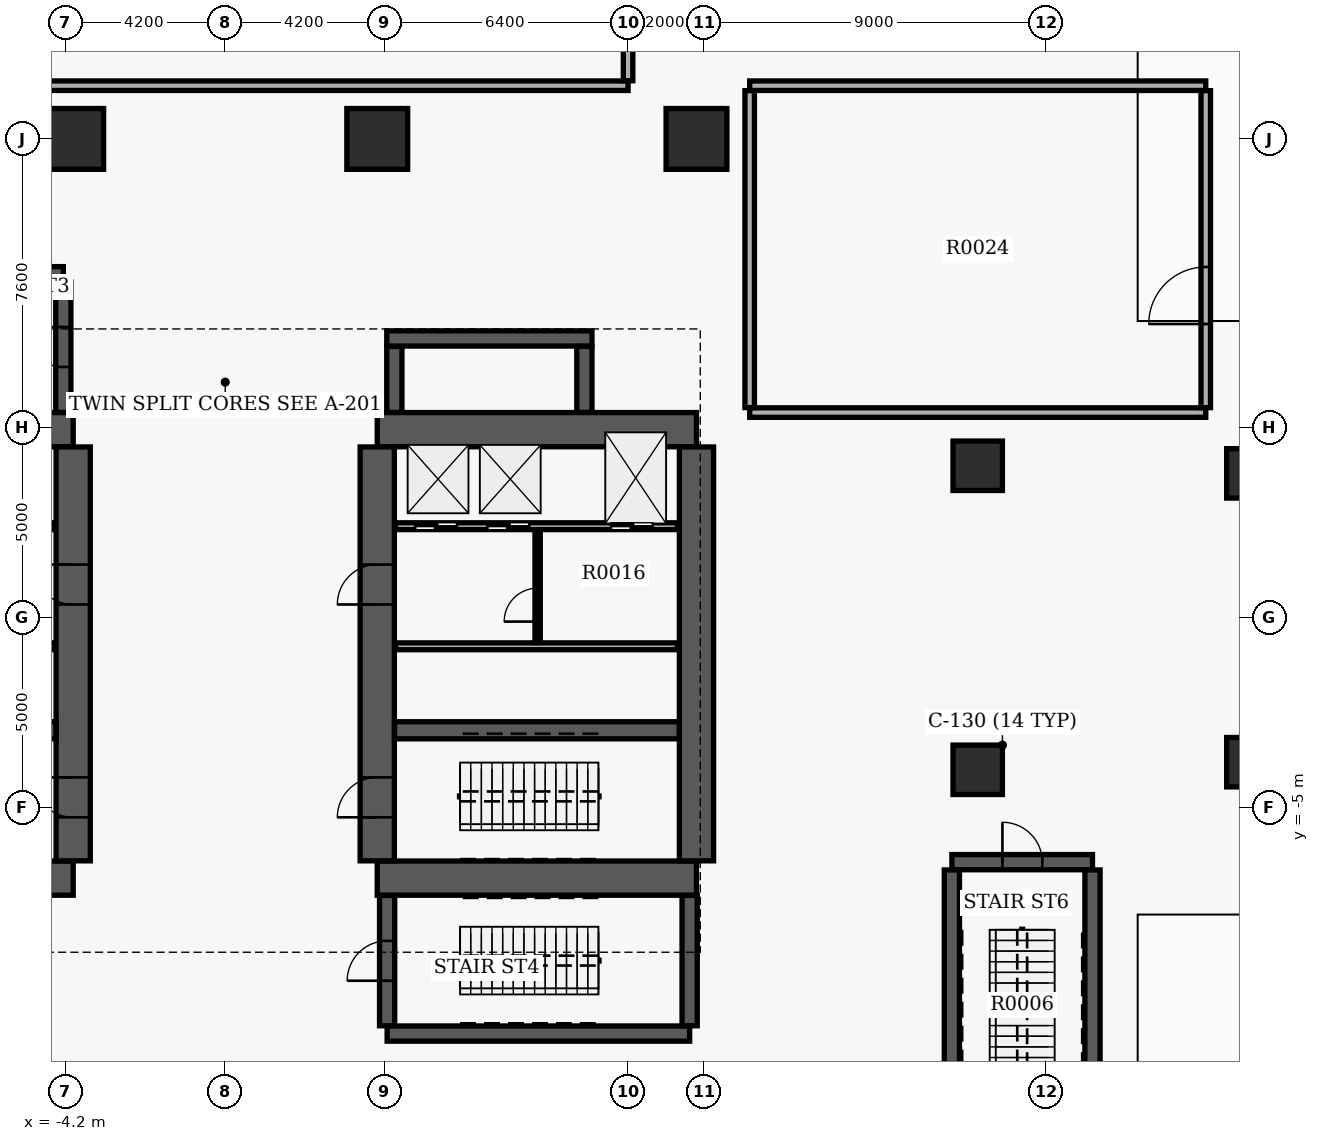
"""IFC4 building model, lengths in metres.
Left out: names, types, materials, properties, quantities, classifications, styles, units other than length and angle.
Written with IfcOpenShell. Run it as: python <this file> out.ifc"""

import sys

from ifc_helpers import new_model, si_unit, direction, frame, frame_2d, origin, origin_2d, place, context, subcontext, project, spatial, rectangle, extrude, element, fill, save


model = new_model("IFC4")
c1 = context("Model", 3, precision=1e-05, world=origin(), true_north=direction((0.0, 1.0)))
c2 = subcontext(c1, "Body", "Model", "MODEL_VIEW")
j1 = project(units=[si_unit("LENGTHUNIT", "METRE"), si_unit("PLANEANGLEUNIT", "RADIAN")], contexts=[c1])
p1 = place(None, origin())
s1 = spatial("IfcSite", under=j1, at=p1, CompositionType="ELEMENT")
p2 = place(p1, origin())
s2 = spatial("IfcBuilding", under=s1, at=p2, CompositionType="ELEMENT")
p3 = place(p2, frame((0.0, 0.0, -10.4)))
s3 = spatial("IfcBuildingStorey", under=s2, at=p3, CompositionType="ELEMENT", Elevation=-10.4)
for number, where, z_axis, x_axis in (
    (1, (-12.4, -6.85, 0.0), (0.0, 0.0, 1.0), (1.0, 0.0, 0.0)),
    (2, (-12.4, 4.95, 0.0), (0.0, 0.0, 1.0), (1.0, 0.0, 0.0)),
):
    element("IfcWall", number, at=place(p3, frame(where, z_axis=z_axis, x_axis=x_axis)), inside=s3, PredefinedType="SHEAR", context=c2, shape_type="SweptSolid", body=[
        extrude(rectangle(XDim=8.4, YDim=0.9, at=frame_2d((4.2, 0.0))), origin(), (0.0, 0.0, 1.0), 4.85),
    ])
p4 = place(p3, frame((-4.0, -6.395, 0.0), z_axis=(0.0, 0.0, 1.0), x_axis=(0.0, 1.0, 0.0)))
e3 = element("IfcWall", 3, at=p4, inside=s3, PredefinedType="SHEAR", context=c2, shape_type="SweptSolid", body=[
    extrude(rectangle(XDim=10.89, YDim=0.9, at=frame_2d((5.445, 0.0))), origin(), (0.0, 0.0, 1.0), 4.85),
])
p5 = place(p4, frame((1.145, 0.0, 0.0)))
e4 = element("IfcOpeningElement", 4, at=p5, cuts=e3, PredefinedType="OPENING", context=c2, shape_type="SweptSolid", body=[
    extrude(rectangle(XDim=1.05, YDim=2.15, at=frame_2d((0.525, 1.075))), frame((0.0, 0.46, 0.0), z_axis=(0.0, -1.0, 0.0), x_axis=(1.0, 0.0, 0.0)), (0.0, 0.0, 1.0), 0.92),
])
p6 = place(p4, frame((6.745, 0.0, 0.0)))
e5 = element("IfcOpeningElement", 5, at=p6, cuts=e3, PredefinedType="OPENING", context=c2, shape_type="SweptSolid", body=[
    extrude(rectangle(XDim=1.05, YDim=2.15, at=frame_2d((0.525, 1.075))), frame((0.0, 0.46, 0.0), z_axis=(0.0, -1.0, 0.0), x_axis=(1.0, 0.0, 0.0)), (0.0, 0.0, 1.0), 0.92),
])
p7 = place(p3, frame((-11.945, -2.96, 0.0), z_axis=(0.0, 0.0, 1.0), x_axis=(1.0, 0.0, 0.0)))
e6 = element("IfcWall", 6, at=p7, inside=s3, PredefinedType="SHEAR", context=c2, shape_type="SweptSolid", body=[
    extrude(rectangle(XDim=7.49, YDim=0.45, at=frame_2d((3.745, 0.0))), origin(), (0.0, 0.0, 1.0), 4.85),
])
for number, where, z_axis, x_axis in (
    (7, (4.0, -6.85, 0.0), (0.0, 0.0, 1.0), (1.0, 0.0, 0.0)),
    (8, (4.0, 4.95, 0.0), (0.0, 0.0, 1.0), (1.0, 0.0, 0.0)),
):
    element("IfcWall", number, at=place(p3, frame(where, z_axis=z_axis, x_axis=x_axis)), inside=s3, PredefinedType="SHEAR", context=c2, shape_type="SweptSolid", body=[
        extrude(rectangle(XDim=8.4, YDim=0.9, at=frame_2d((4.2, 0.0))), origin(), (0.0, 0.0, 1.0), 4.85),
    ])
p8 = place(p3, frame((4.0, -6.395, 0.0), z_axis=(0.0, 0.0, 1.0), x_axis=(0.0, 1.0, 0.0)))
e9 = element("IfcWall", 9, at=p8, inside=s3, PredefinedType="SHEAR", context=c2, shape_type="SweptSolid", body=[
    extrude(rectangle(XDim=10.89, YDim=0.9, at=frame_2d((5.445, 0.0))), origin(), (0.0, 0.0, 1.0), 4.85),
])
p9 = place(p8, frame((1.145, 0.0, 0.0)))
e10 = element("IfcOpeningElement", 10, at=p9, cuts=e9, PredefinedType="OPENING", context=c2, shape_type="SweptSolid", body=[
    extrude(rectangle(XDim=1.05, YDim=2.15, at=frame_2d((0.525, 1.075))), frame((0.0, 0.46, 0.0), z_axis=(0.0, -1.0, 0.0), x_axis=(1.0, 0.0, 0.0)), (0.0, 0.0, 1.0), 0.92),
])
p10 = place(p8, frame((6.745, 0.0, 0.0)))
e11 = element("IfcOpeningElement", 11, at=p10, cuts=e9, PredefinedType="OPENING", context=c2, shape_type="SweptSolid", body=[
    extrude(rectangle(XDim=1.05, YDim=2.15, at=frame_2d((0.525, 1.075))), frame((0.0, 0.46, 0.0), z_axis=(0.0, -1.0, 0.0), x_axis=(1.0, 0.0, 0.0)), (0.0, 0.0, 1.0), 0.92),
])
p11 = place(p3, frame((12.4, -6.395, 0.0), z_axis=(0.0, 0.0, 1.0), x_axis=(0.0, 1.0, 0.0)))
e12 = element("IfcWall", 12, at=p11, inside=s3, PredefinedType="SHEAR", context=c2, shape_type="SweptSolid", body=[
    extrude(rectangle(XDim=10.89, YDim=0.9, at=frame_2d((5.445, 0.0))), origin(), (0.0, 0.0, 1.0), 4.85),
])
p12 = place(p3, frame((4.455, -2.96, 0.0), z_axis=(0.0, 0.0, 1.0), x_axis=(1.0, 0.0, 0.0)))
e13 = element("IfcWall", 13, at=p12, inside=s3, PredefinedType="SHEAR", context=c2, shape_type="SweptSolid", body=[
    extrude(rectangle(XDim=7.49, YDim=0.45, at=frame_2d((3.745, 0.0))), origin(), (0.0, 0.0, 1.0), 4.85),
])
p13 = place(p3, frame((-12.22, 9.04, 0.0), z_axis=(0.0, 0.0, 1.0), x_axis=(1.0, 0.0, 0.0)))
e14 = element("IfcWall", 14, at=p13, inside=s3, PredefinedType="SHEAR", context=c2, shape_type="SweptSolid", body=[
    extrude(rectangle(XDim=7.96, YDim=0.4, at=frame_2d((3.98, 0.0))), origin(), (0.0, 0.0, 1.0), 4.85),
])
p14 = place(p3, frame((-4.26, 5.405, 0.0), z_axis=(0.0, 0.0, 1.0), x_axis=(0.0, 1.0, 0.0)))
e15 = element("IfcWall", 15, at=p14, inside=s3, PredefinedType="SHEAR", context=c2, shape_type="SweptSolid", body=[
    extrude(rectangle(XDim=3.43, YDim=0.4, at=frame_2d((1.715, 0.0))), origin(), (0.0, 0.0, 1.0), 4.85),
])
p15 = place(p14, frame((1.195, 0.0, 0.0)))
e16 = element("IfcOpeningElement", 16, at=p15, cuts=e15, PredefinedType="OPENING", context=c2, shape_type="SweptSolid", body=[
    extrude(rectangle(XDim=1.05, YDim=2.15, at=frame_2d((0.525, 1.075))), frame((0.0, 0.21, 0.0), z_axis=(0.0, -1.0, 0.0), x_axis=(1.0, 0.0, 0.0)), (0.0, 0.0, 1.0), 0.42),
])
p16 = place(p3, frame((4.26, -10.94, 0.0), z_axis=(0.0, 0.0, 1.0), x_axis=(1.0, 0.0, 0.0)))
e17 = element("IfcWall", 17, at=p16, inside=s3, PredefinedType="SHEAR", context=c2, shape_type="SweptSolid", body=[
    extrude(rectangle(XDim=7.96, YDim=0.4, at=frame_2d((3.98, 0.0))), origin(), (0.0, 0.0, 1.0), 4.85),
])
p17 = place(p3, frame((4.26, -10.735, 0.0), z_axis=(0.0, 0.0, 1.0), x_axis=(0.0, 1.0, 0.0)))
e18 = element("IfcWall", 18, at=p17, inside=s3, PredefinedType="SHEAR", context=c2, shape_type="SweptSolid", body=[
    extrude(rectangle(XDim=3.43, YDim=0.4, at=frame_2d((1.715, 0.0))), origin(), (0.0, 0.0, 1.0), 4.85),
])
p18 = place(p17, frame((1.185, 0.0, 0.0)))
e19 = element("IfcOpeningElement", 19, at=p18, cuts=e18, PredefinedType="OPENING", context=c2, shape_type="SweptSolid", body=[
    extrude(rectangle(XDim=1.05, YDim=2.15, at=frame_2d((0.525, 1.075))), frame((0.0, 0.21, 0.0), z_axis=(0.0, -1.0, 0.0), x_axis=(1.0, 0.0, 0.0)), (0.0, 0.0, 1.0), 0.42),
])
p19 = place(p3, frame((12.22, -10.735, 0.0), z_axis=(0.0, 0.0, 1.0), x_axis=(0.0, 1.0, 0.0)))
e20 = element("IfcWall", 20, at=p19, inside=s3, PredefinedType="SHEAR", context=c2, shape_type="SweptSolid", body=[
    extrude(rectangle(XDim=3.43, YDim=0.4, at=frame_2d((1.715, 0.0))), origin(), (0.0, 0.0, 1.0), 4.85),
])
p20 = place(p3, frame((19.12, -6.43, 0.0), z_axis=(0.0, 0.0, 1.0), x_axis=(1.0, 0.0, 0.0)))
e21 = element("IfcWall", 21, at=p20, inside=s3, PredefinedType="SHEAR", context=c2, shape_type="SweptSolid", body=[
    extrude(rectangle(XDim=3.7, YDim=0.4, at=frame_2d((1.85, 0.0))), origin(), (0.0, 0.0, 1.0), 4.85),
])
p21 = place(p20, frame((1.33, 0.0, 0.0)))
e22 = element("IfcOpeningElement", 22, at=p21, cuts=e21, PredefinedType="OPENING", context=c2, shape_type="SweptSolid", body=[
    extrude(rectangle(XDim=1.05, YDim=2.15, at=frame_2d((0.525, 1.075))), frame((0.0, 0.21, 0.0), z_axis=(0.0, -1.0, 0.0), x_axis=(1.0, 0.0, 0.0)), (0.0, 0.0, 1.0), 0.42),
])
for number, where, z_axis, x_axis in (
    (23, (19.12, -13.745, 0.0), (0.0, 0.0, 1.0), (0.0, 1.0, 0.0)),
    (24, (22.82, -13.745, 0.0), (0.0, 0.0, 1.0), (0.0, 1.0, 0.0)),
):
    element("IfcWall", number, at=place(p3, frame(where, z_axis=z_axis, x_axis=x_axis)), inside=s3, PredefinedType="SHEAR", context=c2, shape_type="SweptSolid", body=[
        extrude(rectangle(XDim=7.11, YDim=0.4, at=frame_2d((3.555, 0.0))), origin(), (0.0, 0.0, 1.0), 4.85),
    ])
p22 = place(p3, frame((4.45, 5.405, 0.0), z_axis=(0.0, 0.0, 1.0), x_axis=(0.0, 1.0, 0.0)))
e25 = element("IfcWall", 25, at=p22, inside=s3, PredefinedType="SHEAR", context=c2, shape_type="SweptSolid", body=[
    extrude(rectangle(XDim=1.735, YDim=0.4, at=frame_2d((0.867, 0.0))), origin(), (0.0, 0.0, 1.0), 4.85),
])
p23 = place(p3, frame((4.25, 7.35, 0.0), z_axis=(0.0, 0.0, 1.0), x_axis=(1.0, 0.0, 0.0)))
e26 = element("IfcWall", 26, at=p23, inside=s3, PredefinedType="SHEAR", context=c2, shape_type="SweptSolid", body=[
    extrude(rectangle(XDim=5.4, YDim=0.4, at=frame_2d((2.7, 0.0))), origin(), (0.0, 0.0, 1.0), 4.85),
])
p24 = place(p3, frame((9.45, 5.405, 0.0), z_axis=(0.0, 0.0, 1.0), x_axis=(0.0, 1.0, 0.0)))
e27 = element("IfcWall", 27, at=p24, inside=s3, PredefinedType="SHEAR", context=c2, shape_type="SweptSolid", body=[
    extrude(rectangle(XDim=1.735, YDim=0.4, at=frame_2d((0.867, 0.0))), origin(), (0.0, 0.0, 1.0), 4.85),
])
for number, where, z_axis, x_axis in (
    (28, (12.4, 12.6, 0.0), (0.0, 0.0, 1.0), (1.0, 0.0, 0.0)),
    (29, (4.0, 12.6, 0.0), (0.0, 0.0, 1.0), (1.0, 0.0, 0.0)),
    (30, (-4.0, 12.6, 0.0), (0.0, 0.0, 1.0), (1.0, 0.0, 0.0)),
):
    element("IfcColumn", number, at=place(p3, frame(where, z_axis=z_axis, x_axis=x_axis)), inside=s3, PredefinedType="COLUMN", context=c2, shape_type="SweptSolid", body=[
        extrude(rectangle(XDim=1.6, YDim=1.6, at=origin_2d()), origin(), (0.0, 0.0, 1.0), 5.2),
    ])
for number, where, z_axis, x_axis in (
    (31, (19.8, -4.0, 0.0), (0.0, 0.0, 1.0), (1.0, 0.0, 0.0)),
    (32, (19.8, 4.0, 0.0), (0.0, 0.0, 1.0), (1.0, 0.0, 0.0)),
    (33, (27.0, -3.8, 0.0), (0.0, 0.0, 1.0), (1.0, 0.0, 0.0)),
    (34, (27.0, 3.8, 0.0), (0.0, 0.0, 1.0), (1.0, 0.0, 0.0)),
):
    element("IfcColumn", number, at=place(p3, frame(where, z_axis=z_axis, x_axis=x_axis)), inside=s3, PredefinedType="COLUMN", context=c2, shape_type="SweptSolid", body=[
        extrude(rectangle(XDim=1.3, YDim=1.3, at=origin_2d()), origin(), (0.0, 0.0, 1.0), 5.2),
    ])
p25 = place(p3, frame((-11.9, 2.41, 0.0), z_axis=(0.0, 0.0, 1.0), x_axis=(1.0, 0.0, 0.0)))
e35 = element("IfcWall", 35, at=p25, inside=s3, PredefinedType="SOLIDWALL", context=c2, shape_type="SweptSolid", body=[
    extrude(rectangle(XDim=7.42, YDim=0.18, at=frame_2d((3.71, 0.0))), origin(), (0.0, 0.0, 1.0), 3.87),
])
p26 = place(p25, frame((0.55, 0.0, 0.0)))
e36 = element("IfcOpeningElement", 36, at=p26, cuts=e35, PredefinedType="OPENING", context=c2, shape_type="SweptSolid", body=[
    extrude(rectangle(XDim=1.1, YDim=2.15, at=frame_2d((0.55, 1.075))), frame((0.0, 0.1, 0.0), z_axis=(0.0, -1.0, 0.0), x_axis=(1.0, 0.0, 0.0)), (0.0, 0.0, 1.0), 0.2),
])
p27 = place(p25, frame((3.85, 0.0, 0.0)))
e37 = element("IfcOpeningElement", 37, at=p27, cuts=e35, PredefinedType="OPENING", context=c2, shape_type="SweptSolid", body=[
    extrude(rectangle(XDim=1.1, YDim=2.15, at=frame_2d((0.55, 1.075))), frame((0.0, 0.1, 0.0), z_axis=(0.0, -1.0, 0.0), x_axis=(1.0, 0.0, 0.0)), (0.0, 0.0, 1.0), 0.2),
])
p28 = place(p25, frame((5.75, 0.0, 0.0)))
e38 = element("IfcOpeningElement", 38, at=p28, cuts=e35, PredefinedType="OPENING", context=c2, shape_type="SweptSolid", body=[
    extrude(rectangle(XDim=1.1, YDim=2.15, at=frame_2d((0.55, 1.075))), frame((0.0, 0.1, 0.0), z_axis=(0.0, -1.0, 0.0), x_axis=(1.0, 0.0, 0.0)), (0.0, 0.0, 1.0), 0.2),
])
p29 = place(p3, frame((4.48, 2.41, 0.0), z_axis=(0.0, 0.0, 1.0), x_axis=(1.0, 0.0, 0.0)))
e39 = element("IfcWall", 39, at=p29, inside=s3, PredefinedType="SOLIDWALL", context=c2, shape_type="SweptSolid", body=[
    extrude(rectangle(XDim=7.42, YDim=0.18, at=frame_2d((3.71, 0.0))), origin(), (0.0, 0.0, 1.0), 3.87),
])
p30 = place(p29, frame((5.67, 0.0, 0.0)))
e40 = element("IfcOpeningElement", 40, at=p30, cuts=e39, PredefinedType="OPENING", context=c2, shape_type="SweptSolid", body=[
    extrude(rectangle(XDim=1.1, YDim=2.15, at=frame_2d((0.55, 1.075))), frame((0.0, 0.1, 0.0), z_axis=(0.0, -1.0, 0.0), x_axis=(1.0, 0.0, 0.0)), (0.0, 0.0, 1.0), 0.2),
])
p31 = place(p29, frame((0.52, 0.0, 0.0)))
e41 = element("IfcOpeningElement", 41, at=p31, cuts=e39, PredefinedType="OPENING", context=c2, shape_type="SweptSolid", body=[
    extrude(rectangle(XDim=1.1, YDim=2.15, at=frame_2d((0.55, 1.075))), frame((0.0, 0.1, 0.0), z_axis=(0.0, -1.0, 0.0), x_axis=(1.0, 0.0, 0.0)), (0.0, 0.0, 1.0), 0.2),
])
p32 = place(p29, frame((2.42, 0.0, 0.0)))
e42 = element("IfcOpeningElement", 42, at=p32, cuts=e39, PredefinedType="OPENING", context=c2, shape_type="SweptSolid", body=[
    extrude(rectangle(XDim=1.1, YDim=2.15, at=frame_2d((0.55, 1.075))), frame((0.0, 0.1, 0.0), z_axis=(0.0, -1.0, 0.0), x_axis=(1.0, 0.0, 0.0)), (0.0, 0.0, 1.0), 0.2),
])
for number, where, z_axis, x_axis in (
    (43, (-11.9, -0.75, 0.0), (0.0, 0.0, 1.0), (1.0, 0.0, 0.0)),
    (44, (4.48, -0.75, 0.0), (0.0, 0.0, 1.0), (1.0, 0.0, 0.0)),
):
    element("IfcWall", number, at=place(p3, frame(where, z_axis=z_axis, x_axis=x_axis)), inside=s3, PredefinedType="SOLIDWALL", context=c2, shape_type="SweptSolid", body=[
        extrude(rectangle(XDim=7.42, YDim=0.18, at=frame_2d((3.71, 0.0))), origin(), (0.0, 0.0, 1.0), 3.87),
    ])
p33 = place(p3, frame((8.22, -0.65, 0.0), z_axis=(0.0, 0.0, 1.0), x_axis=(0.0, 1.0, 0.0)))
e45 = element("IfcWall", 45, at=p33, inside=s3, PredefinedType="SOLIDWALL", context=c2, shape_type="SweptSolid", body=[
    extrude(rectangle(XDim=2.96, YDim=0.14, at=frame_2d((1.48, 0.0))), origin(), (0.0, 0.0, 1.0), 3.87),
])
p34 = place(p33, frame((0.55, 0.0, 0.0)))
e46 = element("IfcOpeningElement", 46, at=p34, cuts=e45, PredefinedType="OPENING", context=c2, shape_type="SweptSolid", body=[
    extrude(rectangle(XDim=0.88, YDim=2.1, at=frame_2d((0.44, 1.05))), frame((0.0, 0.08, 0.0), z_axis=(0.0, -1.0, 0.0), x_axis=(1.0, 0.0, 0.0)), (0.0, 0.0, 1.0), 0.16),
])
p35 = place(p3, frame((-10.6, 14.0, 0.0), z_axis=(0.0, 0.0, 1.0), x_axis=(1.0, 0.0, 0.0)))
e47 = element("IfcWall", 47, at=p35, inside=s3, PredefinedType="SOLIDWALL", context=c2, shape_type="SweptSolid", body=[
    extrude(rectangle(XDim=21.2, YDim=0.25, at=frame_2d((10.6, 0.0))), origin(), (0.0, 0.0, 1.0), 3.87),
])
p36 = place(p3, frame((10.6, 14.13, 0.0), z_axis=(0.0, 0.0, 1.0), x_axis=(0.0, 1.0, 0.0)))
e48 = element("IfcWall", 48, at=p36, inside=s3, PredefinedType="SOLIDWALL", context=c2, shape_type="SweptSolid", body=[
    extrude(rectangle(XDim=4.54, YDim=0.25, at=frame_2d((2.27, 0.0))), origin(), (0.0, 0.0, 1.0), 3.87),
])
for number, where, z_axis, x_axis in (
    (49, (13.8, 5.4, 0.0), (0.0, 0.0, 1.0), (1.0, 0.0, 0.0)),
    (50, (13.8, 14.0, 0.0), (0.0, 0.0, 1.0), (1.0, 0.0, 0.0)),
):
    element("IfcWall", number, at=place(p3, frame(where, z_axis=z_axis, x_axis=x_axis)), inside=s3, PredefinedType="SOLIDWALL", context=c2, shape_type="SweptSolid", body=[
        extrude(rectangle(XDim=12.0, YDim=0.25, at=frame_2d((6.0, 0.0))), origin(), (0.0, 0.0, 1.0), 3.87),
    ])
p37 = place(p3, frame((13.8, 5.53, 0.0), z_axis=(0.0, 0.0, 1.0), x_axis=(0.0, 1.0, 0.0)))
e51 = element("IfcWall", 51, at=p37, inside=s3, PredefinedType="SOLIDWALL", context=c2, shape_type="SweptSolid", body=[
    extrude(rectangle(XDim=8.34, YDim=0.25, at=frame_2d((4.17, 0.0))), origin(), (0.0, 0.0, 1.0), 3.87),
])
p38 = place(p3, frame((25.8, 5.53, 0.0), z_axis=(0.0, 0.0, 1.0), x_axis=(0.0, 1.0, 0.0)))
e52 = element("IfcWall", 52, at=p38, inside=s3, PredefinedType="SOLIDWALL", context=c2, shape_type="SweptSolid", body=[
    extrude(rectangle(XDim=8.34, YDim=0.25, at=frame_2d((4.17, 0.0))), origin(), (0.0, 0.0, 1.0), 3.87),
])
p39 = place(p38, frame((2.2, 0.0, 0.0)))
e53 = element("IfcOpeningElement", 53, at=p39, cuts=e52, PredefinedType="OPENING", context=c2, shape_type="SweptSolid", body=[
    extrude(rectangle(XDim=1.5, YDim=2.15, at=frame_2d((0.75, 1.075))), frame((0.0, 0.135, 0.0), z_axis=(0.0, -1.0, 0.0), x_axis=(1.0, 0.0, 0.0)), (0.0, 0.0, 1.0), 0.27),
])
p40 = place(p5, origin())
e54 = element("IfcDoor", 54, at=p40, inside=s3, OperationType="SINGLE_SWING_RIGHT", PredefinedType="DOOR", context=c2, shape_type="SweptSolid", body=[
    extrude(rectangle(XDim=1.05, YDim=2.15, at=frame_2d((0.525, 1.075))), frame((0.0, 0.025, 0.0), z_axis=(0.0, -1.0, 0.0), x_axis=(1.0, 0.0, 0.0)), (0.0, 0.0, 1.0), 0.05),
])
fill(e4, e54)
p41 = place(p9, origin())
e55 = element("IfcDoor", 55, at=p41, inside=s3, OperationType="SINGLE_SWING_LEFT", PredefinedType="DOOR", context=c2, shape_type="SweptSolid", body=[
    extrude(rectangle(XDim=1.05, YDim=2.15, at=frame_2d((0.525, 1.075))), frame((0.0, 0.025, 0.0), z_axis=(0.0, -1.0, 0.0), x_axis=(1.0, 0.0, 0.0)), (0.0, 0.0, 1.0), 0.05),
])
fill(e10, e55)
p42 = place(p6, origin())
e56 = element("IfcDoor", 56, at=p42, inside=s3, OperationType="SINGLE_SWING_RIGHT", PredefinedType="DOOR", context=c2, shape_type="SweptSolid", body=[
    extrude(rectangle(XDim=1.05, YDim=2.15, at=frame_2d((0.525, 1.075))), frame((0.0, 0.025, 0.0), z_axis=(0.0, -1.0, 0.0), x_axis=(1.0, 0.0, 0.0)), (0.0, 0.0, 1.0), 0.05),
])
fill(e5, e56)
p43 = place(p10, origin())
e57 = element("IfcDoor", 57, at=p43, inside=s3, OperationType="SINGLE_SWING_LEFT", PredefinedType="DOOR", context=c2, shape_type="SweptSolid", body=[
    extrude(rectangle(XDim=1.05, YDim=2.15, at=frame_2d((0.525, 1.075))), frame((0.0, 0.025, 0.0), z_axis=(0.0, -1.0, 0.0), x_axis=(1.0, 0.0, 0.0)), (0.0, 0.0, 1.0), 0.05),
])
fill(e11, e57)
p44 = place(p15, origin())
e58 = element("IfcDoor", 58, at=p44, inside=s3, OperationType="SINGLE_SWING_RIGHT", PredefinedType="DOOR", context=c2, shape_type="SweptSolid", body=[
    extrude(rectangle(XDim=1.05, YDim=2.15, at=frame_2d((0.525, 1.075))), frame((0.0, 0.025, 0.0), z_axis=(0.0, -1.0, 0.0), x_axis=(1.0, 0.0, 0.0)), (0.0, 0.0, 1.0), 0.05),
])
fill(e16, e58)
p45 = place(p18, origin())
e59 = element("IfcDoor", 59, at=p45, inside=s3, OperationType="SINGLE_SWING_LEFT", PredefinedType="DOOR", context=c2, shape_type="SweptSolid", body=[
    extrude(rectangle(XDim=1.05, YDim=2.15, at=frame_2d((0.525, 1.075))), frame((0.0, 0.025, 0.0), z_axis=(0.0, -1.0, 0.0), x_axis=(1.0, 0.0, 0.0)), (0.0, 0.0, 1.0), 0.05),
])
fill(e19, e59)
p46 = place(p21, origin())
e60 = element("IfcDoor", 60, at=p46, inside=s3, OperationType="SINGLE_SWING_LEFT", PredefinedType="DOOR", context=c2, shape_type="SweptSolid", body=[
    extrude(rectangle(XDim=1.05, YDim=2.15, at=frame_2d((0.525, 1.075))), frame((0.0, 0.025, 0.0), z_axis=(0.0, -1.0, 0.0), x_axis=(1.0, 0.0, 0.0)), (0.0, 0.0, 1.0), 0.05),
])
fill(e22, e60)
p47 = place(p30, origin())
e61 = element("IfcDoor", 61, at=p47, inside=s3, OperationType="DOUBLE_DOOR_SLIDING", PredefinedType="DOOR", context=c2, shape_type="SweptSolid", body=[
    extrude(rectangle(XDim=1.1, YDim=2.15, at=frame_2d((0.55, 1.075))), frame((0.0, 0.025, 0.0), z_axis=(0.0, -1.0, 0.0), x_axis=(1.0, 0.0, 0.0)), (0.0, 0.0, 1.0), 0.05),
])
fill(e40, e61)
p48 = place(p31, origin())
e62 = element("IfcDoor", 62, at=p48, inside=s3, OperationType="DOUBLE_DOOR_SLIDING", PredefinedType="DOOR", context=c2, shape_type="SweptSolid", body=[
    extrude(rectangle(XDim=1.1, YDim=2.15, at=frame_2d((0.55, 1.075))), frame((0.0, 0.025, 0.0), z_axis=(0.0, -1.0, 0.0), x_axis=(1.0, 0.0, 0.0)), (0.0, 0.0, 1.0), 0.05),
])
fill(e41, e62)
p49 = place(p32, origin())
e63 = element("IfcDoor", 63, at=p49, inside=s3, OperationType="DOUBLE_DOOR_SLIDING", PredefinedType="DOOR", context=c2, shape_type="SweptSolid", body=[
    extrude(rectangle(XDim=1.1, YDim=2.15, at=frame_2d((0.55, 1.075))), frame((0.0, 0.025, 0.0), z_axis=(0.0, -1.0, 0.0), x_axis=(1.0, 0.0, 0.0)), (0.0, 0.0, 1.0), 0.05),
])
fill(e42, e63)
p50 = place(p34, origin())
e64 = element("IfcDoor", 64, at=p50, inside=s3, OperationType="SINGLE_SWING_LEFT", PredefinedType="DOOR", context=c2, shape_type="SweptSolid", body=[
    extrude(rectangle(XDim=0.88, YDim=2.1, at=frame_2d((0.44, 1.05))), frame((0.0, 0.025, 0.0), z_axis=(0.0, -1.0, 0.0), x_axis=(1.0, 0.0, 0.0)), (0.0, 0.0, 1.0), 0.05),
])
fill(e46, e64)
p51 = place(p39, origin())
e65 = element("IfcDoor", 65, at=p51, inside=s3, OperationType="DOUBLE_DOOR_SINGLE_SWING", PredefinedType="DOOR", context=c2, shape_type="SweptSolid", body=[
    extrude(rectangle(XDim=1.5, YDim=2.15, at=frame_2d((0.75, 1.075))), frame((0.0, 0.025, 0.0), z_axis=(0.0, -1.0, 0.0), x_axis=(1.0, 0.0, 0.0)), (0.0, 0.0, 1.0), 0.05),
])
fill(e53, e65)
save(model, sys.argv[1])
